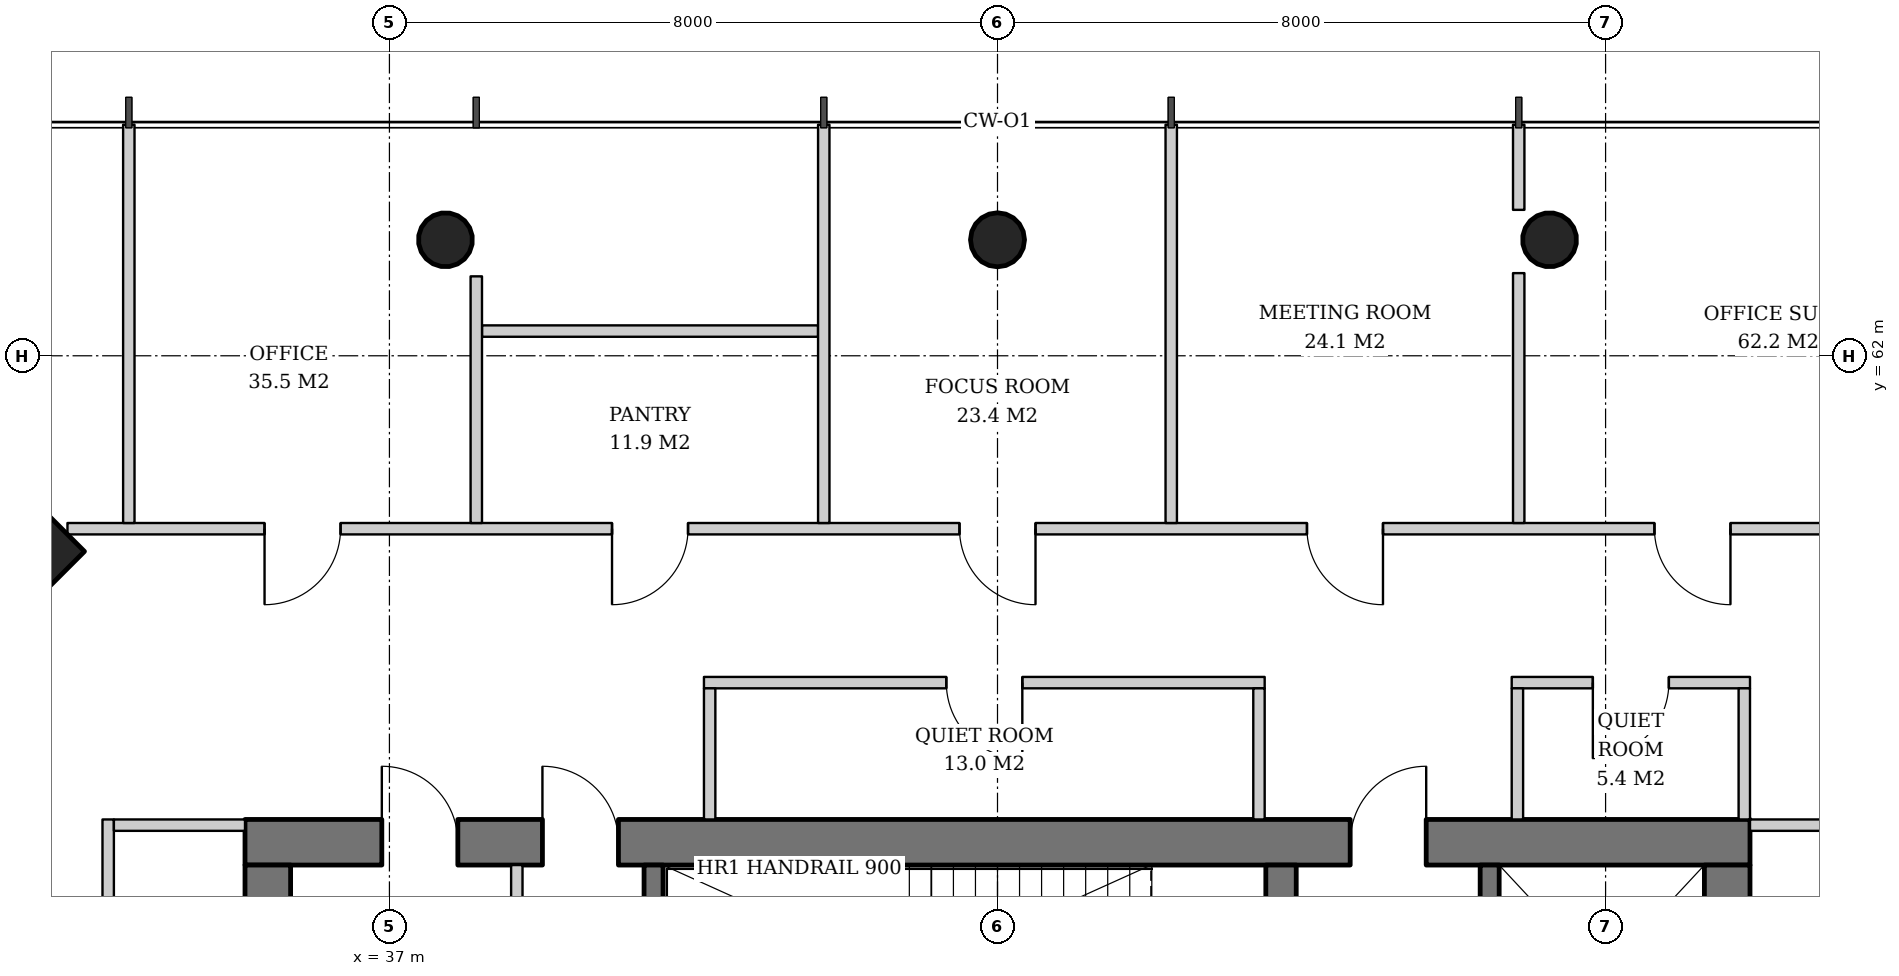
"""IFC4 building model, lengths in metres.
Left out: names, types, materials, properties, quantities, classifications, styles, units other than length and angle.
Written with IfcOpenShell. Run it as: python <this file> out.ifc"""

import sys

from ifc_helpers import new_model, si_unit, direction, frame, frame_2d, origin, origin_2d, place, context, subcontext, project, spatial, rectangle, hollow_circle, extrude, element, fill, save


model = new_model("IFC4")
c1 = context("Model", 3, precision=1e-05, world=origin(), true_north=direction((0.0, 1.0)))
c2 = subcontext(c1, "Body", "Model", "MODEL_VIEW")
j1 = project(units=[si_unit("LENGTHUNIT", "METRE"), si_unit("PLANEANGLEUNIT", "RADIAN")], contexts=[c1])
p1 = place(None, origin())
s1 = spatial("IfcSite", under=j1, at=p1, CompositionType="ELEMENT")
p2 = place(p1, origin())
s2 = spatial("IfcBuilding", under=s1, at=p2, CompositionType="ELEMENT")
p3 = place(p2, frame((0.0, 0.0, 222.4)))
s3 = spatial("IfcBuildingStorey", under=s2, at=p3, CompositionType="ELEMENT", Elevation=222.4)
p4 = place(p3, frame((31.536, 59.464, 0.0), z_axis=(0.031962158256, -0.031962158256, 0.998977898093), x_axis=(0.707106781187, 0.707106781187, 0.0)))
e1 = element("IfcColumn", 1, at=p4, inside=s3, PredefinedType="COLUMN", context=c2, shape_type="SweptSolid", body=[
    extrude(rectangle(XDim=2.0, YDim=2.0, at=origin_2d()), origin(), (0.0, 0.0, 1.0), 3.804),
])
p5 = place(p3, frame((52.282, 63.564, 0.0), z_axis=(-0.015987237665, -0.031910269556, 0.999362868496), x_axis=(0.894067115991, -0.447933021895, 0.0)))
e2 = element("IfcColumn", 2, at=p5, inside=s3, PredefinedType="COLUMN", context=c2, shape_type="SweptSolid", body=[
    extrude(hollow_circle(Radius=0.355, WallThickness=0.025, at=origin_2d()), origin(), (0.0, 0.0, 1.0), 3.802),
])
p6 = place(p3, frame((45.0, 63.564, 0.0), z_axis=(0.0, -0.031914348339, 0.999490607445), x_axis=(1.0, 0.0, 0.0)))
e3 = element("IfcColumn", 3, at=p6, inside=s3, PredefinedType="COLUMN", context=c2, shape_type="SweptSolid", body=[
    extrude(hollow_circle(Radius=0.355, WallThickness=0.025, at=origin_2d()), origin(), (0.0, 0.0, 1.0), 3.802),
])
p7 = place(p3, frame((37.718, 63.564, 0.0), z_axis=(0.015987237665, -0.031910269556, 0.999362868496), x_axis=(0.894067115991, 0.447933021895, 0.0)))
e4 = element("IfcColumn", 4, at=p7, inside=s3, PredefinedType="COLUMN", context=c2, shape_type="SweptSolid", body=[
    extrude(hollow_circle(Radius=0.355, WallThickness=0.025, at=origin_2d()), origin(), (0.0, 0.0, 1.0), 3.802),
])
p8 = place(p3, frame((35.1, 55.6, 0.0), z_axis=(0.0, 0.0, 1.0), x_axis=(1.0, 0.0, 0.0)))
e5 = element("IfcWall", 5, at=p8, inside=s3, PredefinedType="SHEAR", context=c2, shape_type="SweptSolid", body=[
    extrude(rectangle(XDim=19.8, YDim=0.6, at=frame_2d((9.9, 0.0))), origin(), (0.0, 0.0, 1.0), 3.8),
])
p9 = place(p8, frame((14.54, 0.0, 0.0)))
e6 = element("IfcOpeningElement", 6, at=p9, cuts=e5, PredefinedType="OPENING", context=c2, shape_type="SweptSolid", body=[
    extrude(rectangle(XDim=1.0, YDim=2.1, at=frame_2d((0.5, 1.05))), frame((0.0, 0.31, 0.0), z_axis=(0.0, -1.0, 0.0), x_axis=(1.0, 0.0, 0.0)), (0.0, 0.0, 1.0), 0.62),
])
p10 = place(p8, frame((1.8, 0.0, 0.0)))
e7 = element("IfcOpeningElement", 7, at=p10, cuts=e5, PredefinedType="OPENING", context=c2, shape_type="SweptSolid", body=[
    extrude(rectangle(XDim=1.0, YDim=2.1, at=frame_2d((0.5, 1.05))), frame((0.0, 0.31, 0.0), z_axis=(0.0, -1.0, 0.0), x_axis=(1.0, 0.0, 0.0)), (0.0, 0.0, 1.0), 0.62),
])
p11 = place(p8, frame((3.913, 0.0, 0.0)))
e8 = element("IfcOpeningElement", 8, at=p11, cuts=e5, PredefinedType="OPENING", context=c2, shape_type="SweptSolid", body=[
    extrude(rectangle(XDim=1.0, YDim=2.1, at=frame_2d((0.5, 1.05))), frame((0.0, 0.31, 0.0), z_axis=(0.0, -1.0, 0.0), x_axis=(1.0, 0.0, 0.0)), (0.0, 0.0, 1.0), 0.62),
])
p12 = place(p3, frame((35.4, 36.7, 0.0), z_axis=(0.0, 0.0, 1.0), x_axis=(0.0, 1.0, 0.0)))
e9 = element("IfcWall", 9, at=p12, inside=s3, PredefinedType="SHEAR", context=c2, shape_type="SweptSolid", body=[
    extrude(rectangle(XDim=18.6, YDim=0.6, at=frame_2d((9.3, 0.0))), origin(), (0.0, 0.0, 1.0), 3.8),
])
p13 = place(p12, frame((8.4, 0.0, 0.0)))
e10 = element("IfcOpeningElement", 10, at=p13, cuts=e9, PredefinedType="OPENING", context=c2, shape_type="SweptSolid", body=[
    extrude(rectangle(XDim=1.8, YDim=2.4, at=frame_2d((0.9, 1.2))), frame((0.0, 0.31, 0.0), z_axis=(0.0, -1.0, 0.0), x_axis=(1.0, 0.0, 0.0)), (0.0, 0.0, 1.0), 0.62),
])
p14 = place(p3, frame((54.6, 36.7, 0.0), z_axis=(0.0, 0.0, 1.0), x_axis=(0.0, 1.0, 0.0)))
e11 = element("IfcWall", 11, at=p14, inside=s3, PredefinedType="SHEAR", context=c2, shape_type="SweptSolid", body=[
    extrude(rectangle(XDim=18.6, YDim=0.6, at=frame_2d((9.3, 0.0))), origin(), (0.0, 0.0, 1.0), 3.8),
])
p15 = place(p14, frame((8.4, 0.0, 0.0)))
e12 = element("IfcOpeningElement", 12, at=p15, cuts=e11, PredefinedType="OPENING", context=c2, shape_type="SweptSolid", body=[
    extrude(rectangle(XDim=1.8, YDim=2.4, at=frame_2d((0.9, 1.2))), frame((0.0, 0.31, 0.0), z_axis=(0.0, -1.0, 0.0), x_axis=(1.0, 0.0, 0.0)), (0.0, 0.0, 1.0), 0.62),
])
p16 = place(p3, frame((48.73, 52.4, 0.0), z_axis=(0.0, 0.0, 1.0), x_axis=(0.0, 1.0, 0.0)))
e13 = element("IfcWall", 13, at=p16, inside=s3, PredefinedType="SHEAR", context=c2, shape_type="SweptSolid", body=[
    extrude(rectangle(XDim=2.9, YDim=0.4, at=frame_2d((1.45, 0.0))), origin(), (0.0, 0.0, 1.0), 3.8),
])
p17 = place(p16, frame((0.3, 0.0, 0.0)))
e14 = element("IfcOpeningElement", 14, at=p17, cuts=e13, PredefinedType="OPENING", context=c2, shape_type="SweptSolid", body=[
    extrude(rectangle(XDim=1.0, YDim=2.1, at=frame_2d((0.5, 1.05))), frame((0.0, 0.21, 0.0), z_axis=(0.0, -1.0, 0.0), x_axis=(1.0, 0.0, 0.0)), (0.0, 0.0, 1.0), 0.42),
])
p18 = place(p3, frame((40.475, 52.4, 0.0), z_axis=(0.0, 0.0, 1.0), x_axis=(0.0, 1.0, 0.0)))
e15 = element("IfcWall", 15, at=p18, inside=s3, PredefinedType="SHEAR", context=c2, shape_type="SweptSolid", body=[
    extrude(rectangle(XDim=2.9, YDim=0.25, at=frame_2d((1.45, 0.0))), origin(), (0.0, 0.0, 1.0), 3.8),
])
p19 = place(p3, frame((51.475, 52.4, 0.0), z_axis=(0.0, 0.0, 1.0), x_axis=(0.0, 1.0, 0.0)))
e16 = element("IfcWall", 16, at=p19, inside=s3, PredefinedType="SHEAR", context=c2, shape_type="SweptSolid", body=[
    extrude(rectangle(XDim=2.9, YDim=0.25, at=frame_2d((1.45, 0.0))), origin(), (0.0, 0.0, 1.0), 3.8),
])
p20 = place(p19, frame((0.8, 0.0, 0.0)))
e17 = element("IfcOpeningElement", 17, at=p20, cuts=e16, PredefinedType="OPENING", context=c2, shape_type="SweptSolid", body=[
    extrude(rectangle(XDim=1.3, YDim=2.2, at=frame_2d((0.65, 1.1))), frame((0.0, 0.135, 0.0), z_axis=(0.0, -1.0, 0.0), x_axis=(1.0, 0.0, 0.0)), (0.0, 0.0, 1.0), 0.27),
])
p21 = place(p3, frame((38.676, 52.4, 0.0), z_axis=(0.0, 0.0, 1.0), x_axis=(0.0, 1.0, 0.0)))
e18 = element("IfcWall", 18, at=p21, inside=s3, PredefinedType="SOLIDWALL", context=c2, shape_type="SweptSolid", body=[
    extrude(rectangle(XDim=2.9, YDim=0.15, at=frame_2d((1.45, 0.0))), origin(), (0.0, 0.0, 1.0), 3.52),
])
p22 = place(p3, frame((54.9, 55.825, 0.0), z_axis=(0.0, 0.0, 1.0), x_axis=(1.0, 0.0, 0.0)))
e19 = element("IfcWall", 19, at=p22, inside=s3, PredefinedType="PARTITIONING", context=c2, shape_type="SweptSolid", body=[
    extrude(rectangle(XDim=1.725, YDim=0.15, at=frame_2d((0.863, 0.0))), origin(), (0.0, 0.0, 1.0), 3.52),
])
p23 = place(p3, frame((54.9, 57.7, 0.0), z_axis=(0.0, 0.0, 1.0), x_axis=(-1.0, 0.0, 0.0)))
e20 = element("IfcWall", 20, at=p23, inside=s3, PredefinedType="PARTITIONING", context=c2, shape_type="SweptSolid", body=[
    extrude(rectangle(XDim=3.135, YDim=0.15, at=frame_2d((1.567, 0.0))), origin(), (0.0, 0.0, 1.0), 2.92),
])
p24 = place(p23, frame((1.067, 0.0, 0.0)))
e21 = element("IfcOpeningElement", 21, at=p24, cuts=e20, PredefinedType="OPENING", context=c2, shape_type="SweptSolid", body=[
    extrude(rectangle(XDim=1.0, YDim=2.1, at=frame_2d((0.5, 1.05))), frame((0.0, 0.085, 0.0), z_axis=(0.0, -1.0, 0.0), x_axis=(1.0, 0.0, 0.0)), (0.0, 0.0, 1.0), 0.17),
])
p25 = place(p3, frame((54.825, 55.9, 0.0), z_axis=(0.0, 0.0, 1.0), x_axis=(0.0, 1.0, 0.0)))
e22 = element("IfcWall", 22, at=p25, inside=s3, PredefinedType="PARTITIONING", context=c2, shape_type="SweptSolid", body=[
    extrude(rectangle(XDim=1.725, YDim=0.15, at=frame_2d((0.863, 0.0))), origin(), (0.0, 0.0, 1.0), 2.92),
])
p26 = place(p3, frame((51.84, 55.9, 0.0), z_axis=(0.0, 0.0, 1.0), x_axis=(0.0, 1.0, 0.0)))
e23 = element("IfcWall", 23, at=p26, inside=s3, PredefinedType="PARTITIONING", context=c2, shape_type="SweptSolid", body=[
    extrude(rectangle(XDim=1.725, YDim=0.15, at=frame_2d((0.863, 0.0))), origin(), (0.0, 0.0, 1.0), 3.52),
])
p27 = place(p3, frame((48.515, 57.7, 0.0), z_axis=(0.0, 0.0, 1.0), x_axis=(-1.0, 0.0, 0.0)))
e24 = element("IfcWall", 24, at=p27, inside=s3, PredefinedType="PARTITIONING", context=c2, shape_type="SweptSolid", body=[
    extrude(rectangle(XDim=7.377, YDim=0.15, at=frame_2d((3.688, 0.0))), origin(), (0.0, 0.0, 1.0), 2.706),
])
p28 = place(p27, frame((3.188, 0.0, 0.0)))
e25 = element("IfcOpeningElement", 25, at=p28, cuts=e24, PredefinedType="OPENING", context=c2, shape_type="SweptSolid", body=[
    extrude(rectangle(XDim=1.0, YDim=2.1, at=frame_2d((0.5, 1.05))), frame((0.0, 0.085, 0.0), z_axis=(0.0, -1.0, 0.0), x_axis=(1.0, 0.0, 0.0)), (0.0, 0.0, 1.0), 0.17),
])
p29 = place(p3, frame((48.44, 55.9, 0.0), z_axis=(0.0, 0.0, 1.0), x_axis=(0.0, 1.0, 0.0)))
e26 = element("IfcWall", 26, at=p29, inside=s3, PredefinedType="PARTITIONING", context=c2, shape_type="SweptSolid", body=[
    extrude(rectangle(XDim=1.725, YDim=0.15, at=frame_2d((0.863, 0.0))), origin(), (0.0, 0.0, 1.0), 3.52),
])
p30 = place(p3, frame((41.213, 55.9, 0.0), z_axis=(0.0, 0.0, 1.0), x_axis=(0.0, 1.0, 0.0)))
e27 = element("IfcWall", 27, at=p30, inside=s3, PredefinedType="PARTITIONING", context=c2, shape_type="SweptSolid", body=[
    extrude(rectangle(XDim=1.725, YDim=0.15, at=frame_2d((0.863, 0.0))), origin(), (0.0, 0.0, 1.0), 2.706),
])
p31 = place(p3, frame((33.3, 55.9, 0.0), z_axis=(0.0, 0.0, 1.0), x_axis=(0.0, -1.0, 0.0)))
e28 = element("IfcWall", 28, at=p31, inside=s3, PredefinedType="PARTITIONING", context=c2, shape_type="SweptSolid", body=[
    extrude(rectangle(XDim=7.875, YDim=0.15, at=frame_2d((3.938, 0.0))), origin(), (0.0, 0.0, 1.0), 2.706),
])
p32 = place(p31, frame((3.438, 0.0, 0.0)))
e29 = element("IfcOpeningElement", 29, at=p32, cuts=e28, PredefinedType="OPENING", context=c2, shape_type="SweptSolid", body=[
    extrude(rectangle(XDim=1.0, YDim=2.1, at=frame_2d((0.5, 1.05))), frame((0.0, 0.085, 0.0), z_axis=(0.0, -1.0, 0.0), x_axis=(1.0, 0.0, 0.0)), (0.0, 0.0, 1.0), 0.17),
])
p33 = place(p3, frame((35.1, 55.825, 0.0), z_axis=(0.0, 0.0, 1.0), x_axis=(-1.0, 0.0, 0.0)))
e30 = element("IfcWall", 30, at=p33, inside=s3, PredefinedType="PARTITIONING", context=c2, shape_type="SweptSolid", body=[
    extrude(rectangle(XDim=1.725, YDim=0.15, at=frame_2d((0.863, 0.0))), origin(), (0.0, 0.0, 1.0), 2.92),
])
p34 = place(p3, frame((42.639, 62.325, 0.0), z_axis=(0.0, 0.0, 1.0), x_axis=(-1.0, 0.0, 0.0)))
e31 = element("IfcWall", 31, at=p34, inside=s3, PredefinedType="PARTITIONING", context=c2, shape_type="SweptSolid", body=[
    extrude(rectangle(XDim=4.422, YDim=0.15, at=frame_2d((2.211, 0.0))), origin(), (0.0, 0.0, 1.0), 2.706),
])
p35 = place(p3, frame((57.236, 59.725, 0.0), z_axis=(0.0, 0.0, 1.0), x_axis=(-1.0, 0.0, 0.0)))
e32 = element("IfcWall", 32, at=p35, inside=s3, PredefinedType="PARTITIONING", context=c2, shape_type="SweptSolid", body=[
    extrude(rectangle(XDim=24.472, YDim=0.15, at=frame_2d((12.236, 0.0))), origin(), (0.0, 0.0, 1.0), 2.706),
])
p36 = place(p35, frame((2.593, 0.0, 0.0)))
e33 = element("IfcOpeningElement", 33, at=p36, cuts=e32, PredefinedType="OPENING", context=c2, shape_type="SweptSolid", body=[
    extrude(rectangle(XDim=1.0, YDim=2.1, at=frame_2d((0.5, 1.05))), frame((0.0, 0.085, 0.0), z_axis=(0.0, -1.0, 0.0), x_axis=(1.0, 0.0, 0.0)), (0.0, 0.0, 1.0), 0.17),
])
p37 = place(p35, frame((7.164, 0.0, 0.0)))
e34 = element("IfcOpeningElement", 34, at=p37, cuts=e32, PredefinedType="OPENING", context=c2, shape_type="SweptSolid", body=[
    extrude(rectangle(XDim=1.0, YDim=2.1, at=frame_2d((0.5, 1.05))), frame((0.0, 0.085, 0.0), z_axis=(0.0, -1.0, 0.0), x_axis=(1.0, 0.0, 0.0)), (0.0, 0.0, 1.0), 0.17),
])
p38 = place(p35, frame((11.736, 0.0, 0.0)))
e35 = element("IfcOpeningElement", 35, at=p38, cuts=e32, PredefinedType="OPENING", context=c2, shape_type="SweptSolid", body=[
    extrude(rectangle(XDim=1.0, YDim=2.1, at=frame_2d((0.5, 1.05))), frame((0.0, 0.085, 0.0), z_axis=(0.0, -1.0, 0.0), x_axis=(1.0, 0.0, 0.0)), (0.0, 0.0, 1.0), 0.17),
])
p39 = place(p35, frame((16.307, 0.0, 0.0)))
e36 = element("IfcOpeningElement", 36, at=p39, cuts=e32, PredefinedType="OPENING", context=c2, shape_type="SweptSolid", body=[
    extrude(rectangle(XDim=1.0, YDim=2.1, at=frame_2d((0.5, 1.05))), frame((0.0, 0.085, 0.0), z_axis=(0.0, -1.0, 0.0), x_axis=(1.0, 0.0, 0.0)), (0.0, 0.0, 1.0), 0.17),
])
p40 = place(p35, frame((20.879, 0.0, 0.0)))
e37 = element("IfcOpeningElement", 37, at=p40, cuts=e32, PredefinedType="OPENING", context=c2, shape_type="SweptSolid", body=[
    extrude(rectangle(XDim=1.0, YDim=2.1, at=frame_2d((0.5, 1.05))), frame((0.0, 0.085, 0.0), z_axis=(0.0, -1.0, 0.0), x_axis=(1.0, 0.0, 0.0)), (0.0, 0.0, 1.0), 0.17),
])
p41 = place(p3, frame((51.857, 59.8, 0.0), z_axis=(0.0, 0.0, 1.0), x_axis=(0.0, 1.0, 0.0)))
e38 = element("IfcWall", 38, at=p41, inside=s3, PredefinedType="PARTITIONING", context=c2, shape_type="SweptSolid", body=[
    extrude(rectangle(XDim=3.287, YDim=0.15, at=frame_2d((1.644, 0.0))), origin(), (0.0, 0.0, 1.0), 3.52),
])
p42 = place(p3, frame((51.857, 63.92, 0.0), z_axis=(0.0, 0.0, 1.0), x_axis=(0.0, 1.0, 0.0)))
e39 = element("IfcWall", 39, at=p42, inside=s3, PredefinedType="PARTITIONING", context=c2, shape_type="SweptSolid", body=[
    extrude(rectangle(XDim=1.12, YDim=0.15, at=frame_2d((0.56, 0.0))), origin(), (0.0, 0.0, 1.0), 3.52),
])
for number, where, z_axis, x_axis in (
    (40, (47.286, 59.8, 0.0), (0.0, 0.0, 1.0), (0.0, 1.0, 0.0)),
    (41, (42.714, 59.8, 0.0), (0.0, 0.0, 1.0), (0.0, 1.0, 0.0)),
):
    element("IfcWall", number, at=place(p3, frame(where, z_axis=z_axis, x_axis=x_axis)), inside=s3, PredefinedType="PARTITIONING", context=c2, shape_type="SweptSolid", body=[
        extrude(rectangle(XDim=5.24, YDim=0.15, at=frame_2d((2.62, 0.0))), origin(), (0.0, 0.0, 1.0), 3.52),
    ])
p43 = place(p3, frame((38.143, 59.8, 0.0), z_axis=(0.0, 0.0, 1.0), x_axis=(0.0, 1.0, 0.0)))
e42 = element("IfcWall", 42, at=p43, inside=s3, PredefinedType="PARTITIONING", context=c2, shape_type="SweptSolid", body=[
    extrude(rectangle(XDim=3.245, YDim=0.15, at=frame_2d((1.623, 0.0))), origin(), (0.0, 0.0, 1.0), 3.52),
])
p44 = place(p3, frame((33.572, 59.8, 0.0), z_axis=(0.0, 0.0, 1.0), x_axis=(0.0, 1.0, 0.0)))
e43 = element("IfcWall", 43, at=p44, inside=s3, PredefinedType="PARTITIONING", context=c2, shape_type="SweptSolid", body=[
    extrude(rectangle(XDim=5.24, YDim=0.15, at=frame_2d((2.62, 0.0))), origin(), (0.0, 0.0, 1.0), 3.52),
])
p45 = place(p9, origin())
e44 = element("IfcDoor", 44, at=p45, inside=s3, OperationType="SINGLE_SWING_RIGHT", PredefinedType="DOOR", context=c2, shape_type="SweptSolid", body=[
    extrude(rectangle(XDim=1.0, YDim=2.1, at=frame_2d((0.5, 1.05))), frame((0.0, 0.025, 0.0), z_axis=(0.0, -1.0, 0.0), x_axis=(1.0, 0.0, 0.0)), (0.0, 0.0, 1.0), 0.05),
])
fill(e6, e44)
p46 = place(p10, origin())
e45 = element("IfcDoor", 45, at=p46, inside=s3, OperationType="SINGLE_SWING_LEFT", PredefinedType="DOOR", context=c2, shape_type="SweptSolid", body=[
    extrude(rectangle(XDim=1.0, YDim=2.1, at=frame_2d((0.5, 1.05))), frame((0.0, -0.24, 0.0), z_axis=(0.0, -1.0, 0.0), x_axis=(1.0, 0.0, 0.0)), (0.0, 0.0, 1.0), 0.05),
])
fill(e7, e45)
p47 = place(p11, origin())
e46 = element("IfcDoor", 46, at=p47, inside=s3, OperationType="SINGLE_SWING_LEFT", PredefinedType="DOOR", context=c2, shape_type="SweptSolid", body=[
    extrude(rectangle(XDim=1.0, YDim=2.1, at=frame_2d((0.5, 1.05))), frame((0.0, -0.24, 0.0), z_axis=(0.0, -1.0, 0.0), x_axis=(1.0, 0.0, 0.0)), (0.0, 0.0, 1.0), 0.05),
])
fill(e8, e46)
p48 = place(p24, origin())
e47 = element("IfcDoor", 47, at=p48, inside=s3, OperationType="SINGLE_SWING_RIGHT", PredefinedType="DOOR", context=c2, shape_type="SweptSolid", body=[
    extrude(rectangle(XDim=1.0, YDim=2.1, at=frame_2d((0.5, 1.05))), frame((0.0, 0.025, 0.0), z_axis=(0.0, -1.0, 0.0), x_axis=(1.0, 0.0, 0.0)), (0.0, 0.0, 1.0), 0.05),
])
fill(e21, e47)
p49 = place(p28, origin())
e48 = element("IfcDoor", 48, at=p49, inside=s3, OperationType="SINGLE_SWING_LEFT", PredefinedType="DOOR", context=c2, shape_type="SweptSolid", body=[
    extrude(rectangle(XDim=1.0, YDim=2.1, at=frame_2d((0.5, 1.05))), frame((0.0, 0.025, 0.0), z_axis=(0.0, -1.0, 0.0), x_axis=(1.0, 0.0, 0.0)), (0.0, 0.0, 1.0), 0.05),
])
fill(e25, e48)
p50 = place(p36, origin())
e49 = element("IfcDoor", 49, at=p50, inside=s3, OperationType="SINGLE_SWING_LEFT", PredefinedType="DOOR", context=c2, shape_type="SweptSolid", body=[
    extrude(rectangle(XDim=1.0, YDim=2.1, at=frame_2d((0.5, 1.05))), frame((0.0, 0.025, 0.0), z_axis=(0.0, -1.0, 0.0), x_axis=(1.0, 0.0, 0.0)), (0.0, 0.0, 1.0), 0.05),
])
fill(e33, e49)
p51 = place(p37, origin())
e50 = element("IfcDoor", 50, at=p51, inside=s3, OperationType="SINGLE_SWING_LEFT", PredefinedType="DOOR", context=c2, shape_type="SweptSolid", body=[
    extrude(rectangle(XDim=1.0, YDim=2.1, at=frame_2d((0.5, 1.05))), frame((0.0, 0.025, 0.0), z_axis=(0.0, -1.0, 0.0), x_axis=(1.0, 0.0, 0.0)), (0.0, 0.0, 1.0), 0.05),
])
fill(e34, e50)
p52 = place(p38, origin())
e51 = element("IfcDoor", 51, at=p52, inside=s3, OperationType="SINGLE_SWING_LEFT", PredefinedType="DOOR", context=c2, shape_type="SweptSolid", body=[
    extrude(rectangle(XDim=1.0, YDim=2.1, at=frame_2d((0.5, 1.05))), frame((0.0, 0.025, 0.0), z_axis=(0.0, -1.0, 0.0), x_axis=(1.0, 0.0, 0.0)), (0.0, 0.0, 1.0), 0.05),
])
fill(e35, e51)
p53 = place(p39, origin())
e52 = element("IfcDoor", 52, at=p53, inside=s3, OperationType="SINGLE_SWING_RIGHT", PredefinedType="DOOR", context=c2, shape_type="SweptSolid", body=[
    extrude(rectangle(XDim=1.0, YDim=2.1, at=frame_2d((0.5, 1.05))), frame((0.0, 0.025, 0.0), z_axis=(0.0, -1.0, 0.0), x_axis=(1.0, 0.0, 0.0)), (0.0, 0.0, 1.0), 0.05),
])
fill(e36, e52)
p54 = place(p40, origin())
e53 = element("IfcDoor", 53, at=p54, inside=s3, OperationType="SINGLE_SWING_RIGHT", PredefinedType="DOOR", context=c2, shape_type="SweptSolid", body=[
    extrude(rectangle(XDim=1.0, YDim=2.1, at=frame_2d((0.5, 1.05))), frame((0.0, 0.025, 0.0), z_axis=(0.0, -1.0, 0.0), x_axis=(1.0, 0.0, 0.0)), (0.0, 0.0, 1.0), 0.05),
])
fill(e37, e53)
save(model, sys.argv[1])
